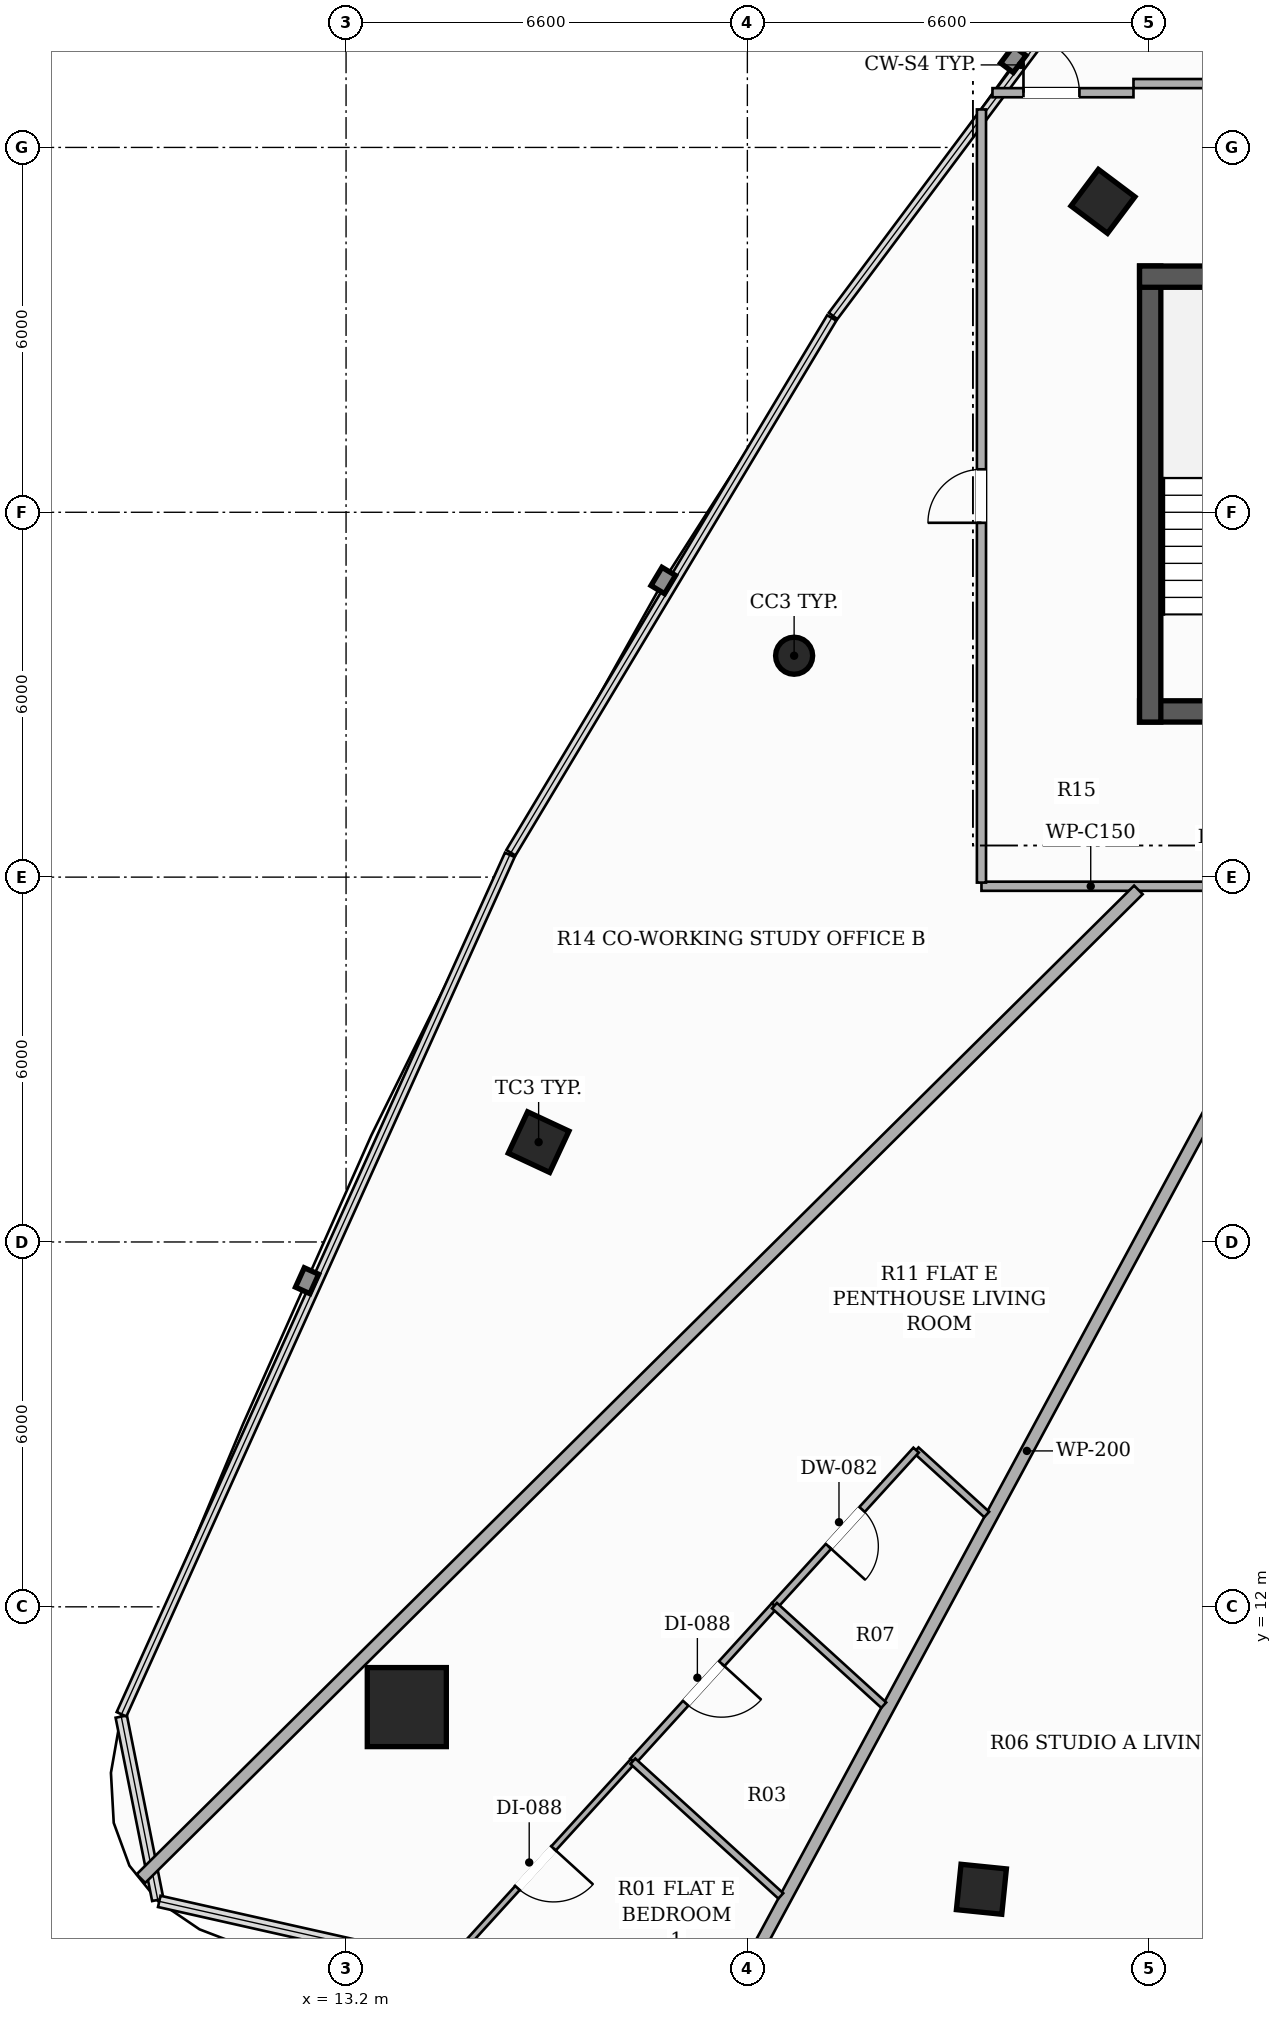
"""IFC4 building model, lengths in metres.
Left out: names, types, materials, properties, quantities, classifications, styles, units other than length and angle.
Written with IfcOpenShell. Run it as: python <this file> out.ifc"""

import sys

from ifc_helpers import new_model, si_unit, direction, frame, frame_2d, origin, origin_2d, place, context, subcontext, project, spatial, rectangle, hollow_rectangle, hollow_circle, extrude, element, fill, save


model = new_model("IFC4")
c1 = context("Model", 3, precision=1e-05, world=origin(), true_north=direction((0.0, 1.0)))
c2 = subcontext(c1, "Body", "Model", "MODEL_VIEW")
j1 = project(units=[si_unit("LENGTHUNIT", "METRE"), si_unit("PLANEANGLEUNIT", "RADIAN")], contexts=[c1])
p1 = place(None, origin())
s1 = spatial("IfcSite", under=j1, at=p1, CompositionType="ELEMENT")
p2 = place(p1, origin())
s2 = spatial("IfcBuilding", under=s1, at=p2, CompositionType="ELEMENT")
p3 = place(p2, frame((0.0, 0.0, 199.7)))
s3 = spatial("IfcBuildingStorey", under=s2, at=p3, CompositionType="ELEMENT", Elevation=199.7)
p4 = place(p3, frame((26.25, 26.725, 0.0), z_axis=(0.0, 0.0, 1.0), x_axis=(1.0, 0.0, 0.0)))
e1 = element("IfcWall", 1, at=p4, inside=s3, PredefinedType="SHEAR", context=c2, shape_type="SweptSolid", body=[
    extrude(rectangle(XDim=13.5, YDim=0.35, at=frame_2d((6.75, 0.0))), origin(), (0.0, 0.0, 1.0), 3.3),
])
p5 = place(p4, frame((4.35, 0.0, 0.0)))
e2 = element("IfcOpeningElement", 2, at=p5, cuts=e1, PredefinedType="OPENING", context=c2, shape_type="SweptSolid", body=[
    extrude(rectangle(XDim=1.05, YDim=2.15, at=frame_2d((0.525, 1.075))), frame((0.0, 0.185, 0.0), z_axis=(0.0, -1.0, 0.0), x_axis=(1.0, 0.0, 0.0)), (0.0, 0.0, 1.0), 0.37),
])
p6 = place(p4, frame((8.3, 0.0, 0.0)))
e3 = element("IfcOpeningElement", 3, at=p6, cuts=e1, PredefinedType="OPENING", context=c2, shape_type="SweptSolid", body=[
    extrude(rectangle(XDim=1.05, YDim=2.15, at=frame_2d((0.525, 1.075))), frame((0.0, 0.185, 0.0), z_axis=(0.0, -1.0, 0.0), x_axis=(1.0, 0.0, 0.0)), (0.0, 0.0, 1.0), 0.37),
])
p7 = place(p3, frame((26.425, 26.55, 0.0), z_axis=(0.0, 0.0, 1.0), x_axis=(0.0, 1.0, 0.0)))
e4 = element("IfcWall", 4, at=p7, inside=s3, PredefinedType="SHEAR", context=c2, shape_type="SweptSolid", body=[
    extrude(rectangle(XDim=7.5, YDim=0.35, at=frame_2d((3.75, 0.0))), origin(), (0.0, 0.0, 1.0), 3.3),
])
p8 = place(p3, frame((26.25, 33.875, 0.0), z_axis=(0.0, 0.0, 1.0), x_axis=(1.0, 0.0, 0.0)))
e5 = element("IfcWall", 5, at=p8, inside=s3, PredefinedType="SHEAR", context=c2, shape_type="SweptSolid", body=[
    extrude(rectangle(XDim=3.6, YDim=0.35, at=frame_2d((1.8, 0.0))), origin(), (0.0, 0.0, 1.0), 3.3),
])
p9 = place(p3, frame((14.199, 10.351, 0.0), z_axis=(0.0, 0.0, 1.0), x_axis=(1.0, 0.0, 0.0)))
e6 = element("IfcColumn", 6, at=p9, inside=s3, PredefinedType="COLUMN", context=c2, shape_type="SweptSolid", body=[
    extrude(hollow_rectangle(XDim=1.3, YDim=1.3, WallThickness=0.04, at=origin_2d()), origin(), (0.0, 0.0, 1.0), 3.3),
])
p10 = place(p3, frame((25.648, 35.113, 0.0), z_axis=(0.0, 0.0, 1.0), x_axis=(0.600420225326, 0.799684658487, 0.0)))
e7 = element("IfcColumn", 7, at=p10, inside=s3, PredefinedType="COLUMN", context=c2, shape_type="SweptSolid", body=[
    extrude(hollow_rectangle(XDim=0.75, YDim=0.75, WallThickness=0.025, at=origin_2d()), origin(), (0.0, 0.0, 1.0), 3.3),
])
p11 = place(p3, frame((20.569, 27.641, 0.0), z_axis=(0.0, 0.0, 1.0), x_axis=(1.0, 0.0, 0.0)))
e8 = element("IfcColumn", 8, at=p11, inside=s3, PredefinedType="COLUMN", context=c2, shape_type="SweptSolid", body=[
    extrude(hollow_circle(Radius=0.305, WallThickness=0.016, at=origin_2d()), origin(), (0.0, 0.0, 1.0), 3.3),
])
for number, where, z_axis, x_axis in (
    (9, (16.367, 19.642, 0.0), (0.0, 0.0, 1.0), (0.423, 0.906, 0.0)),
    (10, (23.649, 7.355, 0.0), (0.0, 0.0, 1.0), (-0.995, 0.101, 0.0)),
):
    element("IfcColumn", number, at=place(p3, frame(where, z_axis=z_axis, x_axis=x_axis)), inside=s3, PredefinedType="COLUMN", context=c2, shape_type="SweptSolid", body=[
        extrude(hollow_rectangle(XDim=0.75, YDim=0.75, WallThickness=0.025, at=origin_2d()), origin(), (0.0, 0.0, 1.0), 3.3),
    ])
p12 = place(p3, frame((32.027, 23.85, 0.0), z_axis=(0.0, 0.0, 1.0), x_axis=(-1.0, 0.0, 0.0)))
e11 = element("IfcWall", 11, at=p12, inside=s3, PredefinedType="PARTITIONING", context=c2, shape_type="SweptSolid", body=[
    extrude(rectangle(XDim=8.377, YDim=0.15, at=frame_2d((4.188, 0.0))), origin(), (0.0, 0.0, 1.0), 2.565),
])
p13 = place(p12, frame((1.014, 0.0, 0.0)))
e12 = element("IfcOpeningElement", 12, at=p13, cuts=e11, PredefinedType="OPENING", context=c2, shape_type="SweptSolid", body=[
    extrude(rectangle(XDim=0.92, YDim=2.15, at=frame_2d((0.46, 1.075))), frame((0.0, 0.085, 0.0), z_axis=(0.0, -1.0, 0.0), x_axis=(1.0, 0.0, 0.0)), (0.0, 0.0, 1.0), 0.17),
])
p14 = place(p12, frame((3.763, 0.0, 0.0)))
e13 = element("IfcOpeningElement", 13, at=p14, cuts=e11, PredefinedType="OPENING", context=c2, shape_type="SweptSolid", body=[
    extrude(rectangle(XDim=0.92, YDim=2.15, at=frame_2d((0.46, 1.075))), frame((0.0, 0.085, 0.0), z_axis=(0.0, -1.0, 0.0), x_axis=(1.0, 0.0, 0.0)), (0.0, 0.0, 1.0), 0.17),
])
p15 = place(p3, frame((23.65, 23.91, 0.0), z_axis=(0.0, 0.0, 1.0), x_axis=(0.0, 1.0, 0.0)))
e14 = element("IfcWall", 14, at=p15, inside=s3, PredefinedType="PARTITIONING", context=c2, shape_type="SweptSolid", body=[
    extrude(rectangle(XDim=12.715, YDim=0.15, at=frame_2d((6.357, 0.0))), origin(), (0.0, 0.0, 1.0), 2.492),
])
p16 = place(p15, frame((5.917, 0.0, 0.0)))
e15 = element("IfcOpeningElement", 15, at=p16, cuts=e14, PredefinedType="OPENING", context=c2, shape_type="SweptSolid", body=[
    extrude(rectangle(XDim=0.88, YDim=2.1, at=frame_2d((0.44, 1.05))), frame((0.0, 0.085, 0.0), z_axis=(0.0, -1.0, 0.0), x_axis=(1.0, 0.0, 0.0)), (0.0, 0.0, 1.0), 0.17),
])
p17 = place(p3, frame((23.831, 36.9, 0.0), z_axis=(0.0, 0.0, 1.0), x_axis=(1.0, 0.0, 0.0)))
e16 = element("IfcWall", 16, at=p17, inside=s3, PredefinedType="PARTITIONING", context=c2, shape_type="SweptSolid", body=[
    extrude(rectangle(XDim=2.319, YDim=0.15, at=frame_2d((1.159, 0.0))), origin(), (0.0, 0.0, 1.0), 2.619),
])
p18 = place(p17, frame((0.51, 0.0, 0.0)))
e17 = element("IfcOpeningElement", 17, at=p18, cuts=e16, PredefinedType="OPENING", context=c2, shape_type="SweptSolid", body=[
    extrude(rectangle(XDim=0.92, YDim=2.15, at=frame_2d((0.46, 1.075))), frame((0.0, 0.085, 0.0), z_axis=(0.0, -1.0, 0.0), x_axis=(1.0, 0.0, 0.0)), (0.0, 0.0, 1.0), 0.17),
])
p19 = place(p3, frame((26.15, 37.05, 0.0), z_axis=(0.0, 0.0, 1.0), x_axis=(1.0, 0.0, 0.0)))
e18 = element("IfcWall", 18, at=p19, inside=s3, PredefinedType="PARTITIONING", context=c2, shape_type="SweptSolid", body=[
    extrude(rectangle(XDim=4.3, YDim=0.15, at=frame_2d((2.15, 0.0))), origin(), (0.0, 0.0, 1.0), 2.425),
])
p20 = place(p3, frame((19.416, 5.338, 0.0), z_axis=(0.0, 0.0, 1.0), x_axis=(0.475065982754, 0.879950175879, 0.0)))
e19 = element("IfcWall", 19, at=p20, inside=s3, PredefinedType="PARTITIONING", context=c2, shape_type="SweptSolid", body=[
    extrude(rectangle(XDim=20.969, YDim=0.2, at=frame_2d((10.485, 0.0))), origin(), (0.0, 0.0, 1.0), 2.492),
])
p21 = place(p3, frame((26.231, 23.79, 0.0), z_axis=(0.0, 0.0, 1.0), x_axis=(-0.710239236144, -0.703960387693, 0.0)))
e20 = element("IfcWall", 20, at=p21, inside=s3, PredefinedType="PARTITIONING", context=c2, shape_type="SweptSolid", body=[
    extrude(rectangle(XDim=23.096, YDim=0.2, at=frame_2d((11.548, 0.0))), origin(), (0.0, 0.0, 1.0), 2.492),
])
p22 = place(p3, frame((23.736, 13.519, 0.0), z_axis=(0.0, 0.0, 1.0), x_axis=(-0.739215251716, 0.673469235846, 0.0)))
e21 = element("IfcWall", 21, at=p22, inside=s3, PredefinedType="PARTITIONING", context=c2, shape_type="SweptSolid", body=[
    extrude(rectangle(XDim=1.571, YDim=0.12, at=frame_2d((0.785, 0.0))), origin(), (0.0, 0.0, 1.0), 3.06),
])
p23 = place(p3, frame((22.575, 14.577, 0.0), z_axis=(0.0, 0.0, 1.0), x_axis=(-0.673231148277, -0.739432093563, 0.0)))
e22 = element("IfcWall", 22, at=p23, inside=s3, PredefinedType="PARTITIONING", context=c2, shape_type="SweptSolid", body=[
    extrude(rectangle(XDim=3.459, YDim=0.12, at=frame_2d((1.729, 0.0))), origin(), (0.0, 0.0, 1.0), 2.773),
])
p24 = place(p23, frame((1.32, 0.0, 0.0)))
e23 = element("IfcOpeningElement", 23, at=p24, cuts=e22, PredefinedType="OPENING", context=c2, shape_type="SweptSolid", body=[
    extrude(rectangle(XDim=0.82, YDim=2.1, at=frame_2d((0.41, 1.05))), frame((0.0, 0.07, 0.0), z_axis=(0.0, -1.0, 0.0), x_axis=(1.0, 0.0, 0.0)), (0.0, 0.0, 1.0), 0.14),
])
p25 = place(p3, frame((20.246, 12.019, 0.0), z_axis=(0.0, 0.0, 1.0), x_axis=(-0.673234602732, -0.739428948368, 0.0)))
e24 = element("IfcWall", 24, at=p25, inside=s3, PredefinedType="PARTITIONING", context=c2, shape_type="SweptSolid", body=[
    extrude(rectangle(XDim=3.459, YDim=0.12, at=frame_2d((1.73, 0.0))), origin(), (0.0, 0.0, 1.0), 2.492),
])
p26 = place(p25, frame((1.29, 0.0, 0.0)))
e25 = element("IfcOpeningElement", 25, at=p26, cuts=e24, PredefinedType="OPENING", context=c2, shape_type="SweptSolid", body=[
    extrude(rectangle(XDim=0.88, YDim=2.1, at=frame_2d((0.44, 1.05))), frame((0.0, 0.07, 0.0), z_axis=(0.0, -1.0, 0.0), x_axis=(1.0, 0.0, 0.0)), (0.0, 0.0, 1.0), 0.14),
])
p27 = place(p3, frame((17.917, 9.461, 0.0), z_axis=(0.0, 0.0, 1.0), x_axis=(-0.673104266943, -0.739547595374, 0.0)))
e26 = element("IfcWall", 26, at=p27, inside=s3, PredefinedType="PARTITIONING", context=c2, shape_type="SweptSolid", body=[
    extrude(rectangle(XDim=4.758, YDim=0.1, at=frame_2d((2.379, 0.0))), origin(), (0.0, 0.0, 1.0), 2.492),
])
p28 = place(p27, frame((1.939, 0.0, 0.0)))
e27 = element("IfcOpeningElement", 27, at=p28, cuts=e26, PredefinedType="OPENING", context=c2, shape_type="SweptSolid", body=[
    extrude(rectangle(XDim=0.88, YDim=2.1, at=frame_2d((0.44, 1.05))), frame((0.0, 0.06, 0.0), z_axis=(0.0, -1.0, 0.0), x_axis=(1.0, 0.0, 0.0)), (0.0, 0.0, 1.0), 0.12),
])
p29 = place(p3, frame((22.043, 10.383, 0.0), z_axis=(0.0, 0.0, 1.0), x_axis=(-0.739435258465, 0.673227672143, 0.0)))
e28 = element("IfcWall", 28, at=p29, inside=s3, PredefinedType="PARTITIONING", context=c2, shape_type="SweptSolid", body=[
    extrude(rectangle(XDim=2.43, YDim=0.12, at=frame_2d((1.215, 0.0))), origin(), (0.0, 0.0, 1.0), 2.773),
])
p30 = place(p3, frame((20.35, 7.246, 0.0), z_axis=(0.0, 0.0, 1.0), x_axis=(-0.739496715577, 0.673160164932, 0.0)))
e29 = element("IfcWall", 29, at=p30, inside=s3, PredefinedType="PARTITIONING", context=c2, shape_type="SweptSolid", body=[
    extrude(rectangle(XDim=3.29, YDim=0.12, at=frame_2d((1.645, 0.0))), origin(), (0.0, 0.0, 1.0), 2.492),
])
p31 = place(p16, origin())
e30 = element("IfcDoor", 30, at=p31, inside=s3, OperationType="SINGLE_SWING_LEFT", PredefinedType="DOOR", context=c2, shape_type="SweptSolid", body=[
    extrude(rectangle(XDim=0.88, YDim=2.1, at=frame_2d((0.44, 1.05))), frame((0.0, 0.025, 0.0), z_axis=(0.0, -1.0, 0.0), x_axis=(1.0, 0.0, 0.0)), (0.0, 0.0, 1.0), 0.05),
])
fill(e15, e30)
p32 = place(p24, origin())
e31 = element("IfcDoor", 31, at=p32, inside=s3, OperationType="SINGLE_SWING_RIGHT", PredefinedType="DOOR", context=c2, shape_type="SweptSolid", body=[
    extrude(rectangle(XDim=0.82, YDim=2.1, at=frame_2d((0.41, 1.05))), frame((0.0, 0.025, 0.0), z_axis=(0.0, -1.0, 0.0), x_axis=(1.0, 0.0, 0.0)), (0.0, 0.0, 1.0), 0.05),
])
fill(e23, e31)
p33 = place(p26, origin())
e32 = element("IfcDoor", 32, at=p33, inside=s3, OperationType="SINGLE_SWING_LEFT", PredefinedType="DOOR", context=c2, shape_type="SweptSolid", body=[
    extrude(rectangle(XDim=0.88, YDim=2.1, at=frame_2d((0.44, 1.05))), frame((0.0, 0.025, 0.0), z_axis=(0.0, -1.0, 0.0), x_axis=(1.0, 0.0, 0.0)), (0.0, 0.0, 1.0), 0.05),
])
fill(e25, e32)
p34 = place(p28, origin())
e33 = element("IfcDoor", 33, at=p34, inside=s3, OperationType="SINGLE_SWING_LEFT", PredefinedType="DOOR", context=c2, shape_type="SweptSolid", body=[
    extrude(rectangle(XDim=0.88, YDim=2.1, at=frame_2d((0.44, 1.05))), frame((0.0, 0.025, 0.0), z_axis=(0.0, -1.0, 0.0), x_axis=(1.0, 0.0, 0.0)), (0.0, 0.0, 1.0), 0.05),
])
fill(e27, e33)
p35 = place(p18, origin())
e34 = element("IfcDoor", 34, at=p35, inside=s3, OperationType="SINGLE_SWING_LEFT", PredefinedType="DOOR", context=c2, shape_type="SweptSolid", body=[
    extrude(rectangle(XDim=0.92, YDim=2.15, at=frame_2d((0.46, 1.075))), frame((0.0, 0.025, 0.0), z_axis=(0.0, -1.0, 0.0), x_axis=(1.0, 0.0, 0.0)), (0.0, 0.0, 1.0), 0.05),
])
fill(e17, e34)
save(model, sys.argv[1])
